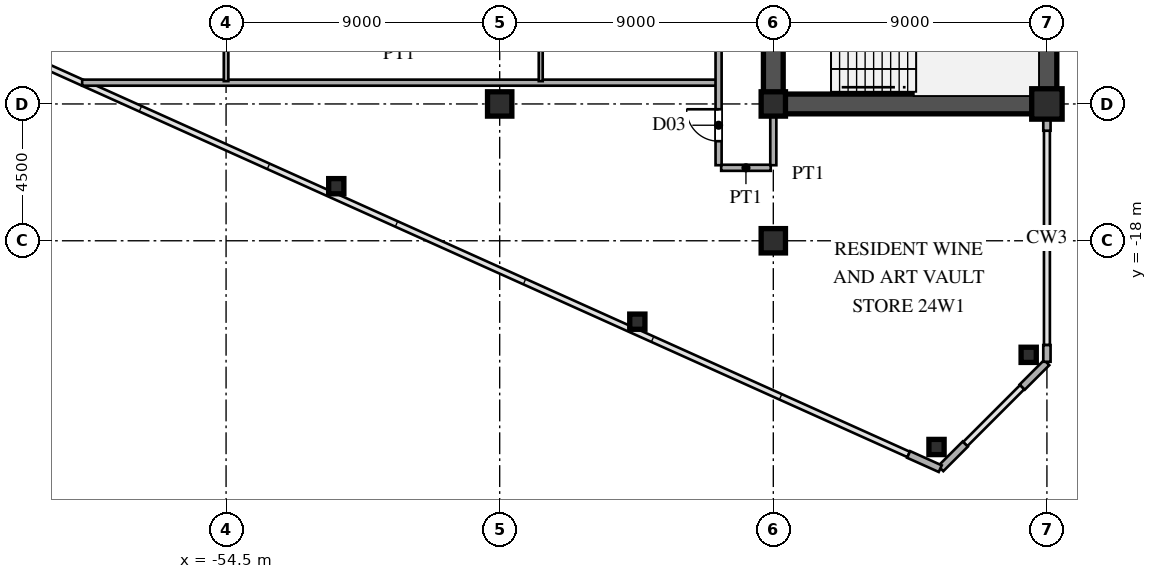
"""IFC4 building model, lengths in metres.
Left out: names, types, materials, properties, quantities, classifications, styles, units other than length and angle.
Written with IfcOpenShell. Run it as: python <this file> out.ifc"""

import sys

from ifc_helpers import new_model, si_unit, direction, frame, frame_2d, origin, origin_2d, place, context, subcontext, project, spatial, rectangle, hollow_rectangle, i_section, extrude, source, transform, mapped, element, fill, save


model = new_model("IFC4")
c1 = context("Model", 3, precision=1e-05, world=origin(), true_north=direction((0.0, 1.0)))
c2 = subcontext(c1, "Body", "Model", "MODEL_VIEW")
j1 = project(units=[si_unit("LENGTHUNIT", "METRE"), si_unit("PLANEANGLEUNIT", "RADIAN")], contexts=[c1])
p1 = place(None, origin())
s1 = spatial("IfcSite", under=j1, at=p1, CompositionType="ELEMENT")
p2 = place(p1, origin())
s2 = spatial("IfcBuilding", under=s1, at=p2, CompositionType="ELEMENT")
p3 = place(p2, frame((0.0, 0.0, 92.4)))
s3 = spatial("IfcBuildingStorey", under=s2, at=p3, CompositionType="ELEMENT", Elevation=92.4)
m1 = source(origin(), c2, "Body", "SweptSolid", [
    extrude(hollow_rectangle(XDim=1.0, YDim=1.0, WallThickness=0.042, at=origin_2d()), origin(), (0.0, 0.0, 1.0), 3.6),
])
p4 = place(p3, frame((-27.5, -13.5, 0.0), z_axis=(0.0, 0.0, 1.0), x_axis=(1.0, 0.0, 0.0)))
e1 = element("IfcColumn", 1, at=p4, inside=s3, PredefinedType="COLUMN", context=c2, shape_type="MappedRepresentation", body=[
    mapped(m1, transform((0.0, 0.0, 0.0), scale=1.0)),
])
m2 = source(origin(), c2, "Body", "SweptSolid", [
    extrude(i_section(OverallWidth=0.8, OverallDepth=0.8, WebThickness=0.032, FlangeThickness=0.05, at=origin_2d()), origin(), (0.0, 0.0, 1.0), 3.6),
])
for number, where, z_axis, x_axis in (
    (2, (-36.5, -18.0, 0.0), (0.0, 0.0, 1.0), (1.0, 0.0, 0.0)),
    (3, (-36.5, -13.5, 0.0), (0.0, 0.0, 1.0), (1.0, 0.0, 0.0)),
    (4, (-45.5, -13.5, 0.0), (0.0, 0.0, 1.0), (1.0, 0.0, 0.0)),
):
    element("IfcColumn", number, at=place(p3, frame(where, z_axis=z_axis, x_axis=x_axis)), inside=s3, PredefinedType="COLUMN", context=c2, shape_type="MappedRepresentation", body=[
        mapped(m2, transform((0.0, 0.0, 0.0), scale=1.0)),
    ])
m3 = source(origin(), c2, "Body", "SweptSolid", [
    extrude(hollow_rectangle(XDim=0.5, YDim=0.5, WallThickness=0.02, at=origin_2d()), origin(), (0.0, 0.0, 1.0), 3.6),
])
for number, where, z_axis, x_axis in (
    (5, (-28.1, -21.751, 0.0), (0.0, 0.0, 1.0), (1.0, 0.0, 0.0)),
    (6, (-31.131, -24.783, 0.0), (0.0, 0.0, 1.0), (1.0, 0.0, 0.0)),
    (7, (-40.973, -20.661, 0.0), (0.0, 0.0, 1.0), (1.0, 0.0, 0.0)),
    (8, (-50.875, -16.205, 0.0), (0.0, 0.0, 1.0), (1.0, 0.0, 0.0)),
):
    element("IfcColumn", number, at=place(p3, frame(where, z_axis=z_axis, x_axis=x_axis)), inside=s3, PredefinedType="COLUMN", context=c2, shape_type="MappedRepresentation", body=[
        mapped(m3, transform((0.0, 0.0, 0.0), scale=1.0)),
    ])
p5 = place(p3, frame((-27.5, -21.98, 0.0), z_axis=(0.0, 0.0, 1.0), x_axis=(0.0, 1.0, 0.0)))
e9 = element("IfcWall", 9, at=p5, inside=s3, PredefinedType="SOLIDWALL", context=c2, shape_type="SweptSolid", body=[
    extrude(rectangle(XDim=0.55, YDim=0.24, at=frame_2d((0.275, 0.0))), origin(), (0.0, 0.0, 1.0), 3.38),
])
p6 = place(p3, frame((-27.5, -14.38, 0.0), z_axis=(0.0, 0.0, 1.0), x_axis=(0.0, 1.0, 0.0)))
e10 = element("IfcWall", 10, at=p6, inside=s3, PredefinedType="SOLIDWALL", context=c2, shape_type="SweptSolid", body=[
    extrude(rectangle(XDim=0.55, YDim=0.24, at=frame_2d((0.275, 0.0))), origin(), (0.0, 0.0, 1.0), 2.88),
])
p7 = place(p3, frame((-32.049, -25.028, 0.0), z_axis=(0.0, 0.0, 1.0), x_axis=(0.911929519623, -0.410346866979, 0.0)))
e11 = element("IfcWall", 11, at=p7, inside=s3, PredefinedType="SOLIDWALL", context=c2, shape_type="SweptSolid", body=[
    extrude(rectangle(XDim=1.14, YDim=0.24, at=frame_2d((0.57, 0.0))), origin(), (0.0, 0.0, 1.0), 3.38),
])
for number, where, z_axis, x_axis in (
    (12, (-30.993, -25.493, 0.0), (0.0, 0.0, 1.0), (0.707, 0.707, 0.0)),
    (13, (-28.313, -22.813, 0.0), (0.0, 0.0, 1.0), (0.707, 0.707, 0.0)),
):
    element("IfcWall", number, at=place(p3, frame(where, z_axis=z_axis, x_axis=x_axis)), inside=s3, PredefinedType="SOLIDWALL", context=c2, shape_type="SweptSolid", body=[
        extrude(rectangle(XDim=1.14, YDim=0.24, at=frame_2d((0.57, 0.0))), origin(), (0.0, 0.0, 1.0), 3.38),
    ])
p8 = place(p3, frame((-27.5, -13.5, 0.0), z_axis=(0.0, 0.0, 1.0), x_axis=(0.0, 1.0, 0.0)))
e14 = element("IfcWall", 14, at=p8, inside=s3, PredefinedType="SHEAR", context=c2, shape_type="SweptSolid", body=[
    extrude(rectangle(XDim=12.2, YDim=0.65, at=frame_2d((6.1, 0.0))), origin(), (0.0, 0.0, 1.0), 3.38),
])
p9 = place(p3, frame((-36.5, -13.5, 0.0), z_axis=(0.0, 0.0, 1.0), x_axis=(1.0, 0.0, 0.0)))
e15 = element("IfcWall", 15, at=p9, inside=s3, PredefinedType="SHEAR", context=c2, shape_type="SweptSolid", body=[
    extrude(rectangle(XDim=9.0, YDim=0.65, at=frame_2d((4.5, 0.0))), origin(), (0.0, 0.0, 1.0), 3.38),
])
p10 = place(p3, frame((-36.5, -13.65, 0.0), z_axis=(0.0, 0.0, 1.0), x_axis=(0.0, 1.0, 0.0)))
e16 = element("IfcWall", 16, at=p10, inside=s3, PredefinedType="SHEAR", context=c2, shape_type="SweptSolid", body=[
    extrude(rectangle(XDim=7.15, YDim=0.65, at=frame_2d((3.575, 0.0))), origin(), (0.0, 0.0, 1.0), 3.38),
])
p11 = place(p10, frame((4.675, 0.0, 0.0)))
e17 = element("IfcOpeningElement", 17, at=p11, cuts=e16, PredefinedType="OPENING", context=c2, shape_type="SweptSolid", body=[
    extrude(rectangle(XDim=1.15, YDim=2.2, at=frame_2d((0.575, 1.1))), frame((0.0, 0.335, 0.0), z_axis=(0.0, -1.0, 0.0), x_axis=(1.0, 0.0, 0.0)), (0.0, 0.0, 1.0), 0.67),
])
p12 = place(p3, frame((-38.215, -15.6, 0.0), z_axis=(0.0, 0.0, 1.0), x_axis=(1.0, 0.0, 0.0)))
e18 = element("IfcWall", 18, at=p12, inside=s3, PredefinedType="PARTITIONING", context=c2, shape_type="SweptSolid", body=[
    extrude(rectangle(XDim=1.63, YDim=0.2, at=frame_2d((0.815, 0.0))), origin(), (0.0, 0.0, 1.0), 3.38),
])
p13 = place(p3, frame((-59.234, -12.8, 0.0), z_axis=(0.0, 0.0, 1.0), x_axis=(1.0, 0.0, 0.0)))
e19 = element("IfcWall", 19, at=p13, inside=s3, PredefinedType="PARTITIONING", context=c2, shape_type="SweptSolid", body=[
    extrude(rectangle(XDim=20.854, YDim=0.2, at=frame_2d((10.427, 0.0))), origin(), (0.0, 0.0, 1.0), 3.38),
])
p14 = place(p3, frame((-54.5, -12.75, 0.0), z_axis=(0.0, 0.0, 1.0), x_axis=(0.0, 1.0, 0.0)))
e20 = element("IfcWall", 20, at=p14, inside=s3, PredefinedType="PARTITIONING", context=c2, shape_type="SweptSolid", body=[
    extrude(rectangle(XDim=27.71, YDim=0.15, at=frame_2d((13.855, 0.0))), origin(), (0.0, 0.0, 1.0), 2.68),
])
p15 = place(p14, frame((4.625, 0.0, 0.0)))
e21 = element("IfcOpeningElement", 21, at=p15, cuts=e20, PredefinedType="OPENING", context=c2, shape_type="SweptSolid", body=[
    extrude(rectangle(XDim=0.95, YDim=2.15, at=frame_2d((0.475, 1.075))), frame((0.0, 0.085, 0.0), z_axis=(0.0, -1.0, 0.0), x_axis=(1.0, 0.0, 0.0)), (0.0, 0.0, 1.0), 0.17),
])
p16 = place(p14, frame((1.192, 0.0, 0.0)))
e22 = element("IfcOpeningElement", 22, at=p16, cuts=e20, PredefinedType="OPENING", context=c2, shape_type="SweptSolid", body=[
    extrude(rectangle(XDim=0.95, YDim=2.15, at=frame_2d((0.475, 1.075))), frame((0.0, 0.085, 0.0), z_axis=(0.0, -1.0, 0.0), x_axis=(1.0, 0.0, 0.0)), (0.0, 0.0, 1.0), 0.17),
])
p17 = place(p14, frame((8.717, 0.0, 0.0)))
e23 = element("IfcOpeningElement", 23, at=p17, cuts=e20, PredefinedType="OPENING", context=c2, shape_type="SweptSolid", body=[
    extrude(rectangle(XDim=0.95, YDim=2.15, at=frame_2d((0.475, 1.075))), frame((0.0, 0.085, 0.0), z_axis=(0.0, -1.0, 0.0), x_axis=(1.0, 0.0, 0.0)), (0.0, 0.0, 1.0), 0.17),
])
p18 = place(p14, frame((15.275, 0.0, 0.0)))
e24 = element("IfcOpeningElement", 24, at=p18, cuts=e20, PredefinedType="OPENING", context=c2, shape_type="SweptSolid", body=[
    extrude(rectangle(XDim=0.95, YDim=2.15, at=frame_2d((0.475, 1.075))), frame((0.0, 0.085, 0.0), z_axis=(0.0, -1.0, 0.0), x_axis=(1.0, 0.0, 0.0)), (0.0, 0.0, 1.0), 0.17),
])
p19 = place(p14, frame((25.835, 0.0, 0.0)))
e25 = element("IfcOpeningElement", 25, at=p19, cuts=e20, PredefinedType="OPENING", context=c2, shape_type="SweptSolid", body=[
    extrude(rectangle(XDim=0.95, YDim=2.15, at=frame_2d((0.475, 1.075))), frame((0.0, 0.085, 0.0), z_axis=(0.0, -1.0, 0.0), x_axis=(1.0, 0.0, 0.0)), (0.0, 0.0, 1.0), 0.17),
])
p20 = place(p3, frame((-44.15, -12.75, 0.0), z_axis=(0.0, 0.0, 1.0), x_axis=(0.0, 1.0, 0.0)))
e26 = element("IfcWall", 26, at=p20, inside=s3, PredefinedType="PARTITIONING", context=c2, shape_type="SweptSolid", body=[
    extrude(rectangle(XDim=2.679, YDim=0.13, at=frame_2d((1.339, 0.0))), origin(), (0.0, 0.0, 1.0), 3.38),
])
p21 = place(p3, frame((-38.3, -15.515, 0.0), z_axis=(0.0, 0.0, 1.0), x_axis=(0.0, 1.0, 0.0)))
e27 = element("IfcWall", 27, at=p21, inside=s3, PredefinedType="PARTITIONING", context=c2, shape_type="SweptSolid", body=[
    extrude(rectangle(XDim=31.03, YDim=0.2, at=frame_2d((15.515, 0.0))), origin(), (0.0, 0.0, 1.0), 3.38),
])
p22 = place(p21, frame((0.79, 0.0, 0.0)))
e28 = element("IfcOpeningElement", 28, at=p22, cuts=e27, PredefinedType="OPENING", context=c2, shape_type="SweptSolid", body=[
    extrude(rectangle(XDim=1.05, YDim=2.25, at=frame_2d((0.525, 1.125))), frame((0.0, 0.11, 0.0), z_axis=(0.0, -1.0, 0.0), x_axis=(1.0, 0.0, 0.0)), (0.0, 0.0, 1.0), 0.22),
])
p23 = place(p21, frame((7.186, 0.0, 0.0)))
e29 = element("IfcOpeningElement", 29, at=p23, cuts=e27, PredefinedType="OPENING", context=c2, shape_type="SweptSolid", body=[
    extrude(rectangle(XDim=1.05, YDim=2.25, at=frame_2d((0.525, 1.125))), frame((0.0, 0.11, 0.0), z_axis=(0.0, -1.0, 0.0), x_axis=(1.0, 0.0, 0.0)), (0.0, 0.0, 1.0), 0.22),
])
p24 = place(p21, frame((17.825, 0.0, 0.0)))
e30 = element("IfcOpeningElement", 30, at=p24, cuts=e27, PredefinedType="OPENING", context=c2, shape_type="SweptSolid", body=[
    extrude(rectangle(XDim=1.05, YDim=2.25, at=frame_2d((0.525, 1.125))), frame((0.0, 0.11, 0.0), z_axis=(0.0, -1.0, 0.0), x_axis=(1.0, 0.0, 0.0)), (0.0, 0.0, 1.0), 0.22),
])
p25 = place(p21, frame((27.635, 0.0, 0.0)))
e31 = element("IfcOpeningElement", 31, at=p25, cuts=e27, PredefinedType="OPENING", context=c2, shape_type="SweptSolid", body=[
    extrude(rectangle(XDim=1.05, YDim=2.25, at=frame_2d((0.525, 1.125))), frame((0.0, 0.11, 0.0), z_axis=(0.0, -1.0, 0.0), x_axis=(1.0, 0.0, 0.0)), (0.0, 0.0, 1.0), 0.22),
])
p26 = place(p3, frame((-36.5, -15.515, 0.0), z_axis=(0.0, 0.0, 1.0), x_axis=(0.0, 1.0, 0.0)))
e32 = element("IfcWall", 32, at=p26, inside=s3, PredefinedType="PARTITIONING", context=c2, shape_type="SweptSolid", body=[
    extrude(rectangle(XDim=1.685, YDim=0.2, at=frame_2d((0.842, 0.0))), origin(), (0.0, 0.0, 1.0), 2.68),
])
m4 = source(origin(), c2, "Body", "SweptSolid", [
    extrude(rectangle(XDim=1.05, YDim=2.25, at=frame_2d((0.525, 1.125))), frame((0.0, 0.025, 0.0), z_axis=(0.0, -1.0, 0.0), x_axis=(1.0, 0.0, 0.0)), (0.0, 0.0, 1.0), 0.05),
])
p27 = place(p22, origin())
e33 = element("IfcDoor", 33, at=p27, inside=s3, OperationType="SINGLE_SWING_RIGHT", PredefinedType="DOOR", context=c2, shape_type="MappedRepresentation", body=[
    mapped(m4, transform((0.0, 0.0, 0.0), scale=1.0)),
])
fill(e28, e33)
save(model, sys.argv[1])
